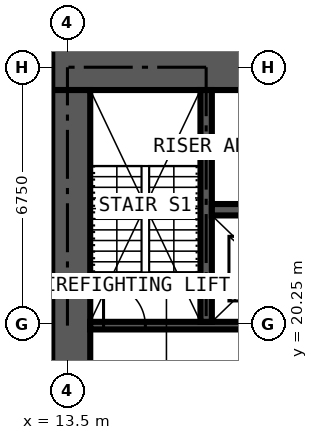
"""IFC4 building model, lengths in metres.
Left out: names, types, materials, properties, quantities, classifications, styles, units other than length and angle.
Written with IfcOpenShell. Run it as: python <this file> out.ifc"""

import sys

from ifc_helpers import new_model, si_unit, direction, frame, frame_2d, origin, place, context, subcontext, project, spatial, rectangle, extrude, element, fill, save


model = new_model("IFC4")
c1 = context("Model", 3, precision=1e-05, world=origin(), true_north=direction((0.0, 1.0)))
c2 = subcontext(c1, "Body", "Model", "MODEL_VIEW")
j1 = project(units=[si_unit("LENGTHUNIT", "METRE"), si_unit("PLANEANGLEUNIT", "RADIAN")], contexts=[c1])
p1 = place(None, origin())
s1 = spatial("IfcSite", under=j1, at=p1, CompositionType="ELEMENT")
p2 = place(p1, origin())
s2 = spatial("IfcBuilding", under=s1, at=p2, CompositionType="ELEMENT")
p3 = place(p2, frame((0.0, 0.0, 160.2)))
s3 = spatial("IfcBuildingStorey", under=s2, at=p3, CompositionType="ELEMENT", Elevation=160.2)
p4 = place(p3, frame((27.4, 27.0, 0.0), z_axis=(0.0, 0.0, 1.0), x_axis=(-1.0, 0.0, 0.0)))
e1 = element("IfcWall", 1, at=p4, inside=s3, PredefinedType="SHEAR", context=c2, shape_type="SweptSolid", body=[
    extrude(rectangle(XDim=14.3, YDim=1.2, at=frame_2d((7.15, 0.0))), origin(), (0.0, 0.0, 1.0), 3.6),
])
p5 = place(p4, frame((4.55, 0.0, 0.0)))
e2 = element("IfcOpeningElement", 2, at=p5, cuts=e1, PredefinedType="OPENING", context=c2, shape_type="SweptSolid", body=[
    extrude(rectangle(XDim=0.9, YDim=2.2, at=frame_2d((0.45, 1.1))), frame((0.0, 0.61, 0.0), z_axis=(0.0, -1.0, 0.0), x_axis=(1.0, 0.0, 0.0)), (0.0, 0.0, 1.0), 1.22),
])
p6 = place(p4, frame((7.525, 0.0, 0.0)))
e3 = element("IfcOpeningElement", 3, at=p6, cuts=e1, PredefinedType="OPENING", context=c2, shape_type="SweptSolid", body=[
    extrude(rectangle(XDim=1.0, YDim=2.2, at=frame_2d((0.5, 1.1))), frame((0.0, 0.61, 0.0), z_axis=(0.0, -1.0, 0.0), x_axis=(1.0, 0.0, 0.0)), (0.0, 0.0, 1.0), 1.22),
])
p7 = place(p3, frame((13.6, 26.4, 0.0), z_axis=(0.0, 0.0, 1.0), x_axis=(0.0, -1.0, 0.0)))
e4 = element("IfcWall", 4, at=p7, inside=s3, PredefinedType="SHEAR", context=c2, shape_type="SweptSolid", body=[
    extrude(rectangle(XDim=12.3, YDim=1.0, at=frame_2d((6.15, 0.0))), origin(), (0.0, 0.0, 1.0), 3.6),
])
p8 = place(p7, frame((7.45, 0.0, 0.0)))
e5 = element("IfcOpeningElement", 5, at=p8, cuts=e4, PredefinedType="OPENING", context=c2, shape_type="SweptSolid", body=[
    extrude(rectangle(XDim=1.2, YDim=2.2, at=frame_2d((0.6, 1.1))), frame((0.0, 0.51, 0.0), z_axis=(0.0, -1.0, 0.0), x_axis=(1.0, 0.0, 0.0)), (0.0, 0.0, 1.0), 1.02),
])
p9 = place(p3, frame((14.1, 20.2, 0.0), z_axis=(0.0, 0.0, 1.0), x_axis=(1.0, 0.0, 0.0)))
e6 = element("IfcWall", 6, at=p9, inside=s3, PredefinedType="SHEAR", context=c2, shape_type="SweptSolid", body=[
    extrude(rectangle(XDim=12.3, YDim=0.2, at=frame_2d((6.15, 0.0))), origin(), (0.0, 0.0, 1.0), 3.6),
])
p10 = place(p9, frame((4.56, 0.0, 0.0)))
e7 = element("IfcOpeningElement", 7, at=p10, cuts=e6, PredefinedType="OPENING", context=c2, shape_type="SweptSolid", body=[
    extrude(rectangle(XDim=1.1, YDim=2.2, at=frame_2d((0.55, 1.1))), frame((0.0, 0.11, 0.0), z_axis=(0.0, -1.0, 0.0), x_axis=(1.0, 0.0, 0.0)), (0.0, 0.0, 1.0), 0.22),
])
p11 = place(p9, frame((6.7, 0.0, 0.0)))
e8 = element("IfcOpeningElement", 8, at=p11, cuts=e6, PredefinedType="OPENING", context=c2, shape_type="SweptSolid", body=[
    extrude(rectangle(XDim=1.1, YDim=2.2, at=frame_2d((0.55, 1.1))), frame((0.0, 0.11, 0.0), z_axis=(0.0, -1.0, 0.0), x_axis=(1.0, 0.0, 0.0)), (0.0, 0.0, 1.0), 0.22),
])
p12 = place(p9, frame((0.35, 0.0, 0.0)))
e9 = element("IfcOpeningElement", 9, at=p12, cuts=e6, PredefinedType="OPENING", context=c2, shape_type="SweptSolid", body=[
    extrude(rectangle(XDim=1.1, YDim=2.2, at=frame_2d((0.55, 1.1))), frame((0.0, 0.11, 0.0), z_axis=(0.0, -1.0, 0.0), x_axis=(1.0, 0.0, 0.0)), (0.0, 0.0, 1.0), 0.22),
])
p13 = place(p9, frame((9.75, 0.0, 0.0)))
e10 = element("IfcOpeningElement", 10, at=p13, cuts=e6, PredefinedType="OPENING", context=c2, shape_type="SweptSolid", body=[
    extrude(rectangle(XDim=1.1, YDim=2.2, at=frame_2d((0.55, 1.1))), frame((0.0, 0.11, 0.0), z_axis=(0.0, -1.0, 0.0), x_axis=(1.0, 0.0, 0.0)), (0.0, 0.0, 1.0), 0.22),
])
p14 = place(p3, frame((17.15, 20.3, 0.0), z_axis=(0.0, 0.0, 1.0), x_axis=(0.0, 1.0, 0.0)))
e11 = element("IfcWall", 11, at=p14, inside=s3, PredefinedType="SHEAR", context=c2, shape_type="SweptSolid", body=[
    extrude(rectangle(XDim=6.1, YDim=0.3, at=frame_2d((3.05, 0.0))), origin(), (0.0, 0.0, 1.0), 3.6),
])
p15 = place(p3, frame((17.3, 23.25, 0.0), z_axis=(0.0, 0.0, 1.0), x_axis=(1.0, 0.0, 0.0)))
e12 = element("IfcWall", 12, at=p15, inside=s3, PredefinedType="SHEAR", context=c2, shape_type="SweptSolid", body=[
    extrude(rectangle(XDim=5.9, YDim=0.3, at=frame_2d((2.95, 0.0))), origin(), (0.0, 0.0, 1.0), 3.6),
])
p16 = place(p12, origin())
e13 = element("IfcDoor", 13, at=p16, inside=s3, OperationType="SINGLE_SWING_LEFT", PredefinedType="DOOR", context=c2, shape_type="SweptSolid", body=[
    extrude(rectangle(XDim=1.1, YDim=2.2, at=frame_2d((0.55, 1.1))), frame((0.0, 0.025, 0.0), z_axis=(0.0, -1.0, 0.0), x_axis=(1.0, 0.0, 0.0)), (0.0, 0.0, 1.0), 0.05),
])
fill(e9, e13)
save(model, sys.argv[1])
